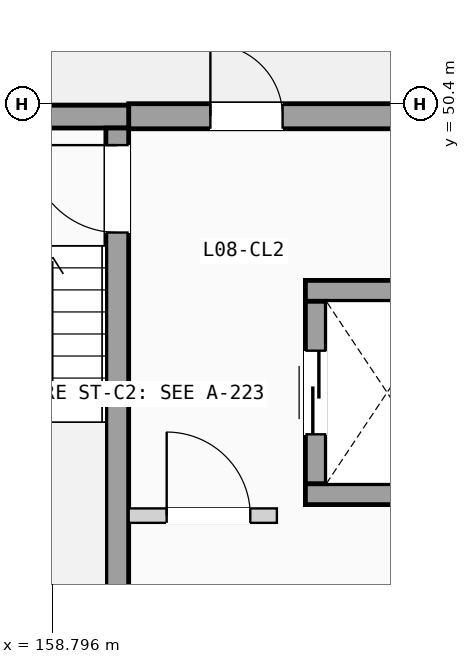
"""IFC4 building model, lengths in metres.
Left out: names, types, materials, properties, quantities, classifications, styles, units other than length and angle.
Written with IfcOpenShell. Run it as: python <this file> out.ifc"""

import sys

from ifc_helpers import new_model, si_unit, direction, frame, frame_2d, origin, place, context, subcontext, project, spatial, rectangle, extrude, element, fill, save


model = new_model("IFC4")
c1 = context("Model", 3, precision=1e-05, world=origin(), true_north=direction((0.0, 1.0)))
c2 = subcontext(c1, "Body", "Model", "MODEL_VIEW")
j1 = project(units=[si_unit("LENGTHUNIT", "METRE"), si_unit("PLANEANGLEUNIT", "RADIAN")], contexts=[c1])
p1 = place(None, origin())
s1 = spatial("IfcSite", under=j1, at=p1, CompositionType="ELEMENT")
p2 = place(p1, origin())
s2 = spatial("IfcBuilding", under=s1, at=p2, CompositionType="ELEMENT")
p3 = place(p2, frame((0.0, 0.0, 27.825)))
s3 = spatial("IfcBuildingStorey", under=s2, at=p3, CompositionType="ELEMENT", Elevation=27.825)
p4 = place(p3, frame((159.8, 50.235, 0.0), z_axis=(0.0, 0.0, 1.0), x_axis=(1.0, 0.0, 0.0)))
e1 = element("IfcWall", 1, at=p4, inside=s3, PredefinedType="SOLIDWALL", context=c2, shape_type="SweptSolid", body=[
    extrude(rectangle(XDim=4.15, YDim=0.33, at=frame_2d((2.075, 0.0))), origin(), (0.0, 0.0, 1.0), 2.89),
])
p5 = place(p4, frame((1.075, 0.0, 0.0)))
e2 = element("IfcOpeningElement", 2, at=p5, cuts=e1, PredefinedType="OPENING", context=c2, shape_type="SweptSolid", body=[
    extrude(rectangle(XDim=0.95, YDim=2.15, at=frame_2d((0.475, 1.075))), frame((0.0, 0.175, 0.0), z_axis=(0.0, -1.0, 0.0), x_axis=(1.0, 0.0, 0.0)), (0.0, 0.0, 1.0), 0.35),
])
p6 = place(p3, frame((156.2, 50.23, 0.0), z_axis=(0.0, 0.0, 1.0), x_axis=(1.0, 0.0, 0.0)))
e3 = element("IfcWall", 3, at=p6, inside=s3, PredefinedType="SHEAR", context=c2, shape_type="SweptSolid", body=[
    extrude(rectangle(XDim=3.6, YDim=0.3, at=frame_2d((1.8, 0.0))), origin(), (0.0, 0.0, 1.0), 2.89),
])
p7 = place(p3, frame((159.65, 43.08, 0.0), z_axis=(0.0, 0.0, 1.0), x_axis=(0.0, 1.0, 0.0)))
e4 = element("IfcWall", 4, at=p7, inside=s3, PredefinedType="SHEAR", context=c2, shape_type="SweptSolid", body=[
    extrude(rectangle(XDim=7.0, YDim=0.3, at=frame_2d((3.5, 0.0))), origin(), (0.0, 0.0, 1.0), 2.89),
])
p8 = place(p7, frame((5.625, 0.0, 0.0)))
e5 = element("IfcOpeningElement", 5, at=p8, cuts=e4, PredefinedType="OPENING", context=c2, shape_type="SweptSolid", body=[
    extrude(rectangle(XDim=1.15, YDim=2.12, at=frame_2d((0.575, 1.06))), frame((0.0, 0.16, 0.0), z_axis=(0.0, -1.0, 0.0), x_axis=(1.0, 0.0, 0.0)), (0.0, 0.0, 1.0), 0.32),
])
for number, where, z_axis, x_axis in (
    (6, (162.125, 45.262, 0.0), (0.0, 0.0, 1.0), (1.0, 0.0, 0.0)),
    (7, (162.125, 47.938, 0.0), (0.0, 0.0, 1.0), (1.0, 0.0, 0.0)),
):
    element("IfcWall", number, at=place(p3, frame(where, z_axis=z_axis, x_axis=x_axis)), inside=s3, PredefinedType="SHEAR", context=c2, shape_type="SweptSolid", body=[
        extrude(rectangle(XDim=2.15, YDim=0.275, at=frame_2d((1.075, 0.0))), origin(), (0.0, 0.0, 1.0), 2.89),
    ])
p9 = place(p3, frame((162.262, 45.4, 0.0), z_axis=(0.0, 0.0, 1.0), x_axis=(0.0, 1.0, 0.0)))
e8 = element("IfcWall", 8, at=p9, inside=s3, PredefinedType="SHEAR", context=c2, shape_type="SweptSolid", body=[
    extrude(rectangle(XDim=2.4, YDim=0.275, at=frame_2d((1.2, 0.0))), origin(), (0.0, 0.0, 1.0), 2.89),
])
p10 = place(p9, frame((0.65, 0.0, 0.0)))
e9 = element("IfcOpeningElement", 9, at=p10, cuts=e8, PredefinedType="OPENING", context=c2, shape_type="SweptSolid", body=[
    extrude(rectangle(XDim=1.1, YDim=2.15, at=frame_2d((0.55, 1.075))), frame((0.0, 0.147, 0.0), z_axis=(0.0, -1.0, 0.0), x_axis=(1.0, 0.0, 0.0)), (0.0, 0.0, 1.0), 0.295),
])
p11 = place(p3, frame((159.8, 44.98, 0.0), z_axis=(0.0, 0.0, 1.0), x_axis=(1.0, 0.0, 0.0)))
e10 = element("IfcWall", 10, at=p11, inside=s3, PredefinedType="PARTITIONING", context=c2, shape_type="SweptSolid", body=[
    extrude(rectangle(XDim=1.95, YDim=0.19, at=frame_2d((0.975, 0.0))), origin(), (0.0, 0.0, 1.0), 2.87),
])
p12 = place(p11, frame((0.5, 0.0, 0.0)))
e11 = element("IfcOpeningElement", 11, at=p12, cuts=e10, PredefinedType="OPENING", context=c2, shape_type="SweptSolid", body=[
    extrude(rectangle(XDim=1.1, YDim=2.12, at=frame_2d((0.55, 1.06))), frame((0.0, 0.105, 0.0), z_axis=(0.0, -1.0, 0.0), x_axis=(1.0, 0.0, 0.0)), (0.0, 0.0, 1.0), 0.21),
])
p13 = place(p5, origin())
e12 = element("IfcDoor", 12, at=p13, inside=s3, OperationType="SINGLE_SWING_LEFT", PredefinedType="DOOR", context=c2, shape_type="SweptSolid", body=[
    extrude(rectangle(XDim=0.95, YDim=2.15, at=frame_2d((0.475, 1.075))), frame((0.0, 0.025, 0.0), z_axis=(0.0, -1.0, 0.0), x_axis=(1.0, 0.0, 0.0)), (0.0, 0.0, 1.0), 0.05),
])
fill(e2, e12)
p14 = place(p8, origin())
e13 = element("IfcDoor", 13, at=p14, inside=s3, OperationType="SINGLE_SWING_RIGHT", PredefinedType="DOOR", context=c2, shape_type="SweptSolid", body=[
    extrude(rectangle(XDim=1.15, YDim=2.12, at=frame_2d((0.575, 1.06))), frame((0.0, 0.025, 0.0), z_axis=(0.0, -1.0, 0.0), x_axis=(1.0, 0.0, 0.0)), (0.0, 0.0, 1.0), 0.05),
])
fill(e5, e13)
p15 = place(p10, origin())
e14 = element("IfcDoor", 14, at=p15, inside=s3, OperationType="SLIDING_TO_LEFT", PredefinedType="DOOR", context=c2, shape_type="SweptSolid", body=[
    extrude(rectangle(XDim=1.1, YDim=2.15, at=frame_2d((0.55, 1.075))), frame((0.0, 0.025, 0.0), z_axis=(0.0, -1.0, 0.0), x_axis=(1.0, 0.0, 0.0)), (0.0, 0.0, 1.0), 0.05),
])
fill(e9, e14)
p16 = place(p12, origin())
e15 = element("IfcDoor", 15, at=p16, inside=s3, OperationType="SINGLE_SWING_LEFT", PredefinedType="DOOR", context=c2, shape_type="SweptSolid", body=[
    extrude(rectangle(XDim=1.1, YDim=2.12, at=frame_2d((0.55, 1.06))), frame((0.0, 0.025, 0.0), z_axis=(0.0, -1.0, 0.0), x_axis=(1.0, 0.0, 0.0)), (0.0, 0.0, 1.0), 0.05),
])
fill(e11, e15)
save(model, sys.argv[1])
